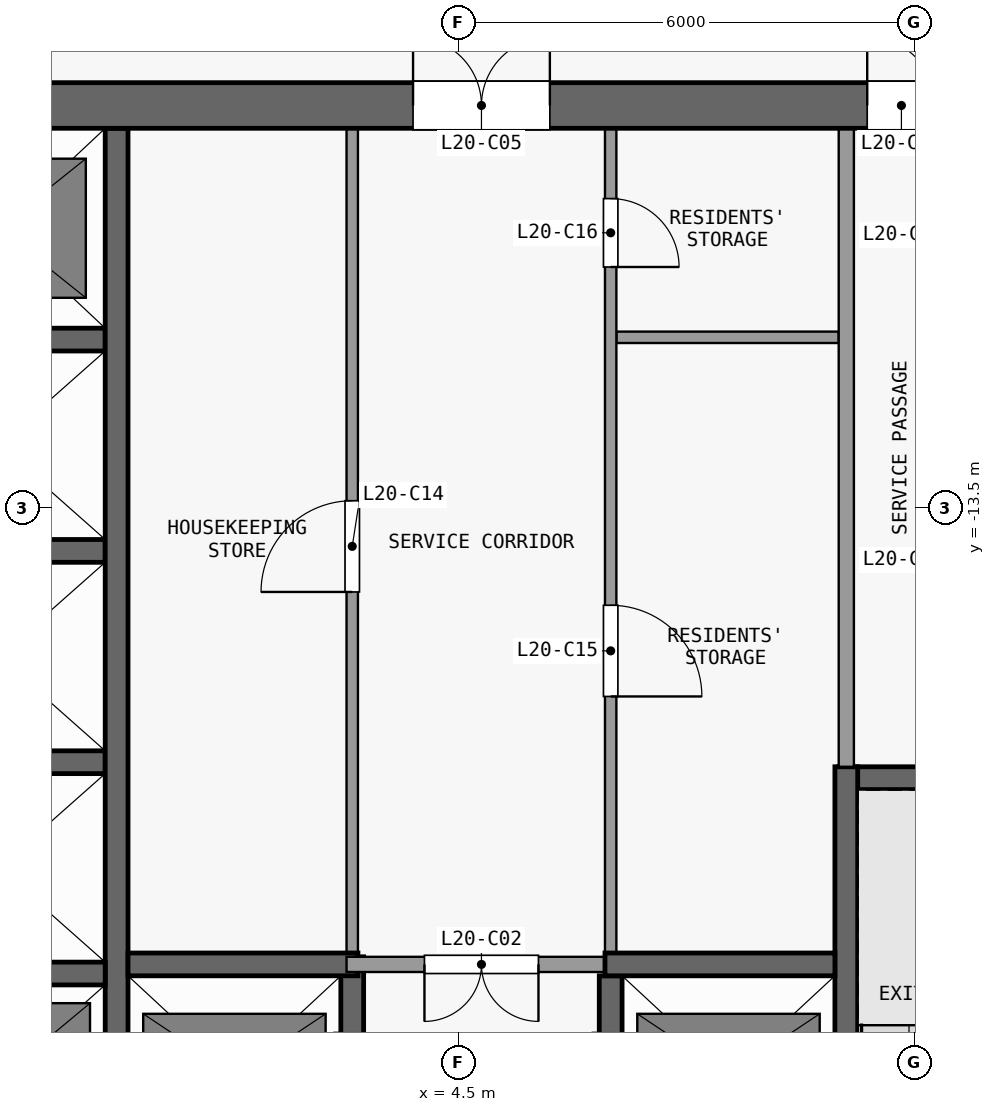
"""IFC4 building model, lengths in metres.
Left out: names, types, materials, properties, quantities, classifications, styles, units other than length and angle.
Written with IfcOpenShell. Run it as: python <this file> out.ifc"""

import sys

from ifc_helpers import new_model, si_unit, direction, frame, frame_2d, origin, place, context, subcontext, project, spatial, rectangle, extrude, element, fill, save


model = new_model("IFC4")
c1 = context("Model", 3, precision=1e-05, world=origin(), true_north=direction((0.0, 1.0)))
c2 = subcontext(c1, "Body", "Model", "MODEL_VIEW")
j1 = project(units=[si_unit("LENGTHUNIT", "METRE"), si_unit("PLANEANGLEUNIT", "RADIAN")], contexts=[c1])
p1 = place(None, origin())
s1 = spatial("IfcSite", under=j1, at=p1, CompositionType="ELEMENT")
p2 = place(p1, origin())
s2 = spatial("IfcBuilding", under=s1, at=p2, CompositionType="ELEMENT")
p3 = place(p2, frame((0.0, 0.0, 84.7)))
s3 = spatial("IfcBuildingStorey", under=s2, at=p3, CompositionType="ELEMENT", Elevation=84.7)
p4 = place(p3, frame((-13.4, -8.2, 0.0), z_axis=(0.0, 0.0, 1.0), x_axis=(1.0, 0.0, 0.0)))
e1 = element("IfcWall", 1, at=p4, inside=s3, PredefinedType="SHEAR", context=c2, shape_type="SweptSolid", body=[
    extrude(rectangle(XDim=26.8, YDim=0.6, at=frame_2d((13.4, 0.0))), origin(), (0.0, 0.0, 1.0), 3.3),
])
p5 = place(p4, frame((7.7, 0.0, 0.0)))
e2 = element("IfcOpeningElement", 2, at=p5, cuts=e1, PredefinedType="OPENING", context=c2, shape_type="SweptSolid", body=[
    extrude(rectangle(XDim=1.8, YDim=2.1, at=frame_2d((0.9, 1.05))), frame((0.0, 0.31, 0.0), z_axis=(0.0, -1.0, 0.0), x_axis=(1.0, 0.0, 0.0)), (0.0, 0.0, 1.0), 0.62),
])
p6 = place(p4, frame((17.3, 0.0, 0.0)))
e3 = element("IfcOpeningElement", 3, at=p6, cuts=e1, PredefinedType="OPENING", context=c2, shape_type="SweptSolid", body=[
    extrude(rectangle(XDim=1.8, YDim=2.1, at=frame_2d((0.9, 1.05))), frame((0.0, 0.31, 0.0), z_axis=(0.0, -1.0, 0.0), x_axis=(1.0, 0.0, 0.0)), (0.0, 0.0, 1.0), 0.62),
])
p7 = place(p4, frame((2.625, 0.0, 0.0)))
e4 = element("IfcOpeningElement", 4, at=p7, cuts=e1, PredefinedType="OPENING", context=c2, shape_type="SweptSolid", body=[
    extrude(rectangle(XDim=0.9, YDim=2.1, at=frame_2d((0.45, 1.05))), frame((0.0, 0.31, 0.0), z_axis=(0.0, -1.0, 0.0), x_axis=(1.0, 0.0, 0.0)), (0.0, 0.0, 1.0), 0.62),
])
p8 = place(p4, frame((23.275, 0.0, 0.0)))
e5 = element("IfcOpeningElement", 5, at=p8, cuts=e1, PredefinedType="OPENING", context=c2, shape_type="SweptSolid", body=[
    extrude(rectangle(XDim=0.9, YDim=2.1, at=frame_2d((0.45, 1.05))), frame((0.0, 0.31, 0.0), z_axis=(0.0, -1.0, 0.0), x_axis=(1.0, 0.0, 0.0)), (0.0, 0.0, 1.0), 0.62),
])
p9 = place(p3, frame((-2.95, -19.62, 0.0), z_axis=(0.0, 0.0, 1.0), x_axis=(1.0, 0.0, 0.0)))
e6 = element("IfcWall", 6, at=p9, inside=s3, PredefinedType="SHEAR", context=c2, shape_type="SweptSolid", body=[
    extrude(rectangle(XDim=2.8, YDim=0.3, at=frame_2d((1.4, 0.0))), origin(), (0.0, 0.0, 1.0), 3.3),
])
p10 = place(p3, frame((0.15, -19.5, 0.0), z_axis=(0.0, 0.0, 1.0), x_axis=(1.0, 0.0, 0.0)))
e7 = element("IfcWall", 7, at=p10, inside=s3, PredefinedType="SHEAR", context=c2, shape_type="SweptSolid", body=[
    extrude(rectangle(XDim=3.025, YDim=0.3, at=frame_2d((1.513, 0.0))), origin(), (0.0, 0.0, 1.0), 3.3),
])
p11 = place(p3, frame((6.575, -19.5, 0.0), z_axis=(0.0, 0.0, 1.0), x_axis=(-1.0, 0.0, 0.0)))
e8 = element("IfcWall", 8, at=p11, inside=s3, PredefinedType="PARTITIONING", context=c2, shape_type="SweptSolid", body=[
    extrude(rectangle(XDim=3.55, YDim=0.2, at=frame_2d((1.775, 0.0))), origin(), (0.0, 0.0, 1.0), 3.3),
])
p12 = place(p11, frame((1.025, 0.0, 0.0)))
e9 = element("IfcOpeningElement", 9, at=p12, cuts=e8, PredefinedType="OPENING", context=c2, shape_type="SweptSolid", body=[
    extrude(rectangle(XDim=1.5, YDim=2.1, at=frame_2d((0.75, 1.05))), frame((0.0, 0.11, 0.0), z_axis=(0.0, -1.0, 0.0), x_axis=(1.0, 0.0, 0.0)), (0.0, 0.0, 1.0), 0.22),
])
p13 = place(p3, frame((6.425, -19.5, 0.0), z_axis=(0.0, 0.0, 1.0), x_axis=(1.0, 0.0, 0.0)))
e10 = element("IfcWall", 10, at=p13, inside=s3, PredefinedType="SHEAR", context=c2, shape_type="SweptSolid", body=[
    extrude(rectangle(XDim=3.025, YDim=0.3, at=frame_2d((1.512, 0.0))), origin(), (0.0, 0.0, 1.0), 3.3),
])
p14 = place(p3, frame((9.5, -17.05, 0.0), z_axis=(0.0, 0.0, 1.0), x_axis=(1.0, 0.0, 0.0)))
e11 = element("IfcWall", 11, at=p14, inside=s3, PredefinedType="SHEAR", context=c2, shape_type="SweptSolid", body=[
    extrude(rectangle(XDim=3.1, YDim=0.3, at=frame_2d((1.55, 0.0))), origin(), (0.0, 0.0, 1.0), 3.3),
])
for number, where, z_axis, x_axis in (
    (12, (-2.95, -16.84, 0.0), (0.0, 0.0, 1.0), (1.0, 0.0, 0.0)),
    (13, (-2.95, -14.06, 0.0), (0.0, 0.0, 1.0), (1.0, 0.0, 0.0)),
    (14, (-2.95, -11.28, 0.0), (0.0, 0.0, 1.0), (1.0, 0.0, 0.0)),
):
    element("IfcWall", number, at=place(p3, frame(where, z_axis=z_axis, x_axis=x_axis)), inside=s3, PredefinedType="SHEAR", context=c2, shape_type="SweptSolid", body=[
        extrude(rectangle(XDim=2.8, YDim=0.3, at=frame_2d((1.4, 0.0))), origin(), (0.0, 0.0, 1.0), 3.3),
    ])
p15 = place(p3, frame((6.575, -11.25, 0.0), z_axis=(0.0, 0.0, 1.0), x_axis=(1.0, 0.0, 0.0)))
e15 = element("IfcWall", 15, at=p15, inside=s3, PredefinedType="PARTITIONING", context=c2, shape_type="SweptSolid", body=[
    extrude(rectangle(XDim=2.925, YDim=0.15, at=frame_2d((1.462, 0.0))), origin(), (0.0, 0.0, 1.0), 3.3),
])
p16 = place(p3, frame((0.0, -22.25, 0.0), z_axis=(0.0, 0.0, 1.0), x_axis=(0.0, 1.0, 0.0)))
e16 = element("IfcWall", 16, at=p16, inside=s3, PredefinedType="SHEAR", context=c2, shape_type="SweptSolid", body=[
    extrude(rectangle(XDim=13.75, YDim=0.3, at=frame_2d((6.875, 0.0))), origin(), (0.0, 0.0, 1.0), 3.3),
])
p17 = place(p3, frame((3.1, -22.25, 0.0), z_axis=(0.0, 0.0, 1.0), x_axis=(0.0, 1.0, 0.0)))
e17 = element("IfcWall", 17, at=p17, inside=s3, PredefinedType="SHEAR", context=c2, shape_type="SweptSolid", body=[
    extrude(rectangle(XDim=2.85, YDim=0.3, at=frame_2d((1.425, 0.0))), origin(), (0.0, 0.0, 1.0), 3.3),
])
p18 = place(p17, frame((0.75, 0.0, 0.0)))
e18 = element("IfcOpeningElement", 18, at=p18, cuts=e17, PredefinedType="OPENING", context=c2, shape_type="SweptSolid", body=[
    extrude(rectangle(XDim=1.1, YDim=2.1, at=frame_2d((0.55, 1.05))), frame((0.0, 0.16, 0.0), z_axis=(0.0, -1.0, 0.0), x_axis=(1.0, 0.0, 0.0)), (0.0, 0.0, 1.0), 0.32),
])
p19 = place(p3, frame((3.1, -19.4, 0.0), z_axis=(0.0, 0.0, 1.0), x_axis=(0.0, 1.0, 0.0)))
e19 = element("IfcWall", 19, at=p19, inside=s3, PredefinedType="PARTITIONING", context=c2, shape_type="SweptSolid", body=[
    extrude(rectangle(XDim=10.9, YDim=0.15, at=frame_2d((5.45, 0.0))), origin(), (0.0, 0.0, 1.0), 3.3),
])
p20 = place(p19, frame((4.8, 0.0, 0.0)))
e20 = element("IfcOpeningElement", 20, at=p20, cuts=e19, PredefinedType="OPENING", context=c2, shape_type="SweptSolid", body=[
    extrude(rectangle(XDim=1.2, YDim=2.1, at=frame_2d((0.6, 1.05))), frame((0.0, 0.085, 0.0), z_axis=(0.0, -1.0, 0.0), x_axis=(1.0, 0.0, 0.0)), (0.0, 0.0, 1.0), 0.17),
])
p21 = place(p3, frame((6.5, -22.25, 0.0), z_axis=(0.0, 0.0, 1.0), x_axis=(0.0, 1.0, 0.0)))
e21 = element("IfcWall", 21, at=p21, inside=s3, PredefinedType="SHEAR", context=c2, shape_type="SweptSolid", body=[
    extrude(rectangle(XDim=2.6, YDim=0.3, at=frame_2d((1.3, 0.0))), origin(), (0.0, 0.0, 1.0), 3.3),
])
p22 = place(p21, frame((0.75, 0.0, 0.0)))
e22 = element("IfcOpeningElement", 22, at=p22, cuts=e21, PredefinedType="OPENING", context=c2, shape_type="SweptSolid", body=[
    extrude(rectangle(XDim=1.1, YDim=2.1, at=frame_2d((0.55, 1.05))), frame((0.0, 0.16, 0.0), z_axis=(0.0, -1.0, 0.0), x_axis=(1.0, 0.0, 0.0)), (0.0, 0.0, 1.0), 0.32),
])
p23 = place(p3, frame((6.5, -8.5, 0.0), z_axis=(0.0, 0.0, 1.0), x_axis=(0.0, -1.0, 0.0)))
e23 = element("IfcWall", 23, at=p23, inside=s3, PredefinedType="PARTITIONING", context=c2, shape_type="SweptSolid", body=[
    extrude(rectangle(XDim=10.85, YDim=0.15, at=frame_2d((5.425, 0.0))), origin(), (0.0, 0.0, 1.0), 3.3),
])
p24 = place(p23, frame((6.275, 0.0, 0.0)))
e24 = element("IfcOpeningElement", 24, at=p24, cuts=e23, PredefinedType="OPENING", context=c2, shape_type="SweptSolid", body=[
    extrude(rectangle(XDim=1.2, YDim=2.1, at=frame_2d((0.6, 1.05))), frame((0.0, 0.085, 0.0), z_axis=(0.0, -1.0, 0.0), x_axis=(1.0, 0.0, 0.0)), (0.0, 0.0, 1.0), 0.17),
])
p25 = place(p23, frame((0.925, 0.0, 0.0)))
e25 = element("IfcOpeningElement", 25, at=p25, cuts=e23, PredefinedType="OPENING", context=c2, shape_type="SweptSolid", body=[
    extrude(rectangle(XDim=0.9, YDim=2.1, at=frame_2d((0.45, 1.05))), frame((0.0, 0.085, 0.0), z_axis=(0.0, -1.0, 0.0), x_axis=(1.0, 0.0, 0.0)), (0.0, 0.0, 1.0), 0.17),
])
p26 = place(p3, frame((9.6, -16.9, 0.0), z_axis=(0.0, 0.0, 1.0), x_axis=(0.0, -1.0, 0.0)))
e26 = element("IfcWall", 26, at=p26, inside=s3, PredefinedType="SHEAR", context=c2, shape_type="SweptSolid", body=[
    extrude(rectangle(XDim=7.7, YDim=0.3, at=frame_2d((3.85, 0.0))), origin(), (0.0, 0.0, 1.0), 3.3),
])
p27 = place(p26, frame((6.5, 0.0, 0.0)))
e27 = element("IfcOpeningElement", 27, at=p27, cuts=e26, PredefinedType="OPENING", context=c2, shape_type="SweptSolid", body=[
    extrude(rectangle(XDim=1.1, YDim=2.1, at=frame_2d((0.55, 1.05))), frame((0.0, 0.16, 0.0), z_axis=(0.0, -1.0, 0.0), x_axis=(1.0, 0.0, 0.0)), (0.0, 0.0, 1.0), 0.32),
])
p28 = place(p3, frame((9.6, -16.9, 0.0), z_axis=(0.0, 0.0, 1.0), x_axis=(0.0, 1.0, 0.0)))
e28 = element("IfcWall", 28, at=p28, inside=s3, PredefinedType="PARTITIONING", context=c2, shape_type="SweptSolid", body=[
    extrude(rectangle(XDim=8.4, YDim=0.2, at=frame_2d((4.2, 0.0))), origin(), (0.0, 0.0, 1.0), 3.3),
])
p29 = place(p12, origin())
e29 = element("IfcDoor", 29, at=p29, inside=s3, OperationType="DOUBLE_DOOR_SINGLE_SWING", PredefinedType="DOOR", context=c2, shape_type="SweptSolid", body=[
    extrude(rectangle(XDim=1.5, YDim=2.1, at=frame_2d((0.75, 1.05))), frame((0.0, 0.025, 0.0), z_axis=(0.0, -1.0, 0.0), x_axis=(1.0, 0.0, 0.0)), (0.0, 0.0, 1.0), 0.05),
])
fill(e9, e29)
p30 = place(p6, origin())
e30 = element("IfcDoor", 30, at=p30, inside=s3, OperationType="DOUBLE_DOOR_SINGLE_SWING", PredefinedType="DOOR", context=c2, shape_type="SweptSolid", body=[
    extrude(rectangle(XDim=1.8, YDim=2.1, at=frame_2d((0.9, 1.05))), frame((0.0, 0.025, 0.0), z_axis=(0.0, -1.0, 0.0), x_axis=(1.0, 0.0, 0.0)), (0.0, 0.0, 1.0), 0.05),
])
fill(e3, e30)
p31 = place(p8, origin())
e31 = element("IfcDoor", 31, at=p31, inside=s3, OperationType="SINGLE_SWING_LEFT", PredefinedType="DOOR", context=c2, shape_type="SweptSolid", body=[
    extrude(rectangle(XDim=0.9, YDim=2.1, at=frame_2d((0.45, 1.05))), frame((0.0, 0.025, 0.0), z_axis=(0.0, -1.0, 0.0), x_axis=(1.0, 0.0, 0.0)), (0.0, 0.0, 1.0), 0.05),
])
fill(e5, e31)
p32 = place(p20, origin())
e32 = element("IfcDoor", 32, at=p32, inside=s3, OperationType="SINGLE_SWING_LEFT", PredefinedType="DOOR", context=c2, shape_type="SweptSolid", body=[
    extrude(rectangle(XDim=1.2, YDim=2.1, at=frame_2d((0.6, 1.05))), frame((0.0, 0.025, 0.0), z_axis=(0.0, -1.0, 0.0), x_axis=(1.0, 0.0, 0.0)), (0.0, 0.0, 1.0), 0.05),
])
fill(e20, e32)
p33 = place(p24, origin())
e33 = element("IfcDoor", 33, at=p33, inside=s3, OperationType="SINGLE_SWING_RIGHT", PredefinedType="DOOR", context=c2, shape_type="SweptSolid", body=[
    extrude(rectangle(XDim=1.2, YDim=2.1, at=frame_2d((0.6, 1.05))), frame((0.0, 0.025, 0.0), z_axis=(0.0, -1.0, 0.0), x_axis=(1.0, 0.0, 0.0)), (0.0, 0.0, 1.0), 0.05),
])
fill(e24, e33)
p34 = place(p25, origin())
e34 = element("IfcDoor", 34, at=p34, inside=s3, OperationType="SINGLE_SWING_RIGHT", PredefinedType="DOOR", context=c2, shape_type="SweptSolid", body=[
    extrude(rectangle(XDim=0.9, YDim=2.1, at=frame_2d((0.45, 1.05))), frame((0.0, 0.025, 0.0), z_axis=(0.0, -1.0, 0.0), x_axis=(1.0, 0.0, 0.0)), (0.0, 0.0, 1.0), 0.05),
])
fill(e25, e34)
save(model, sys.argv[1])
